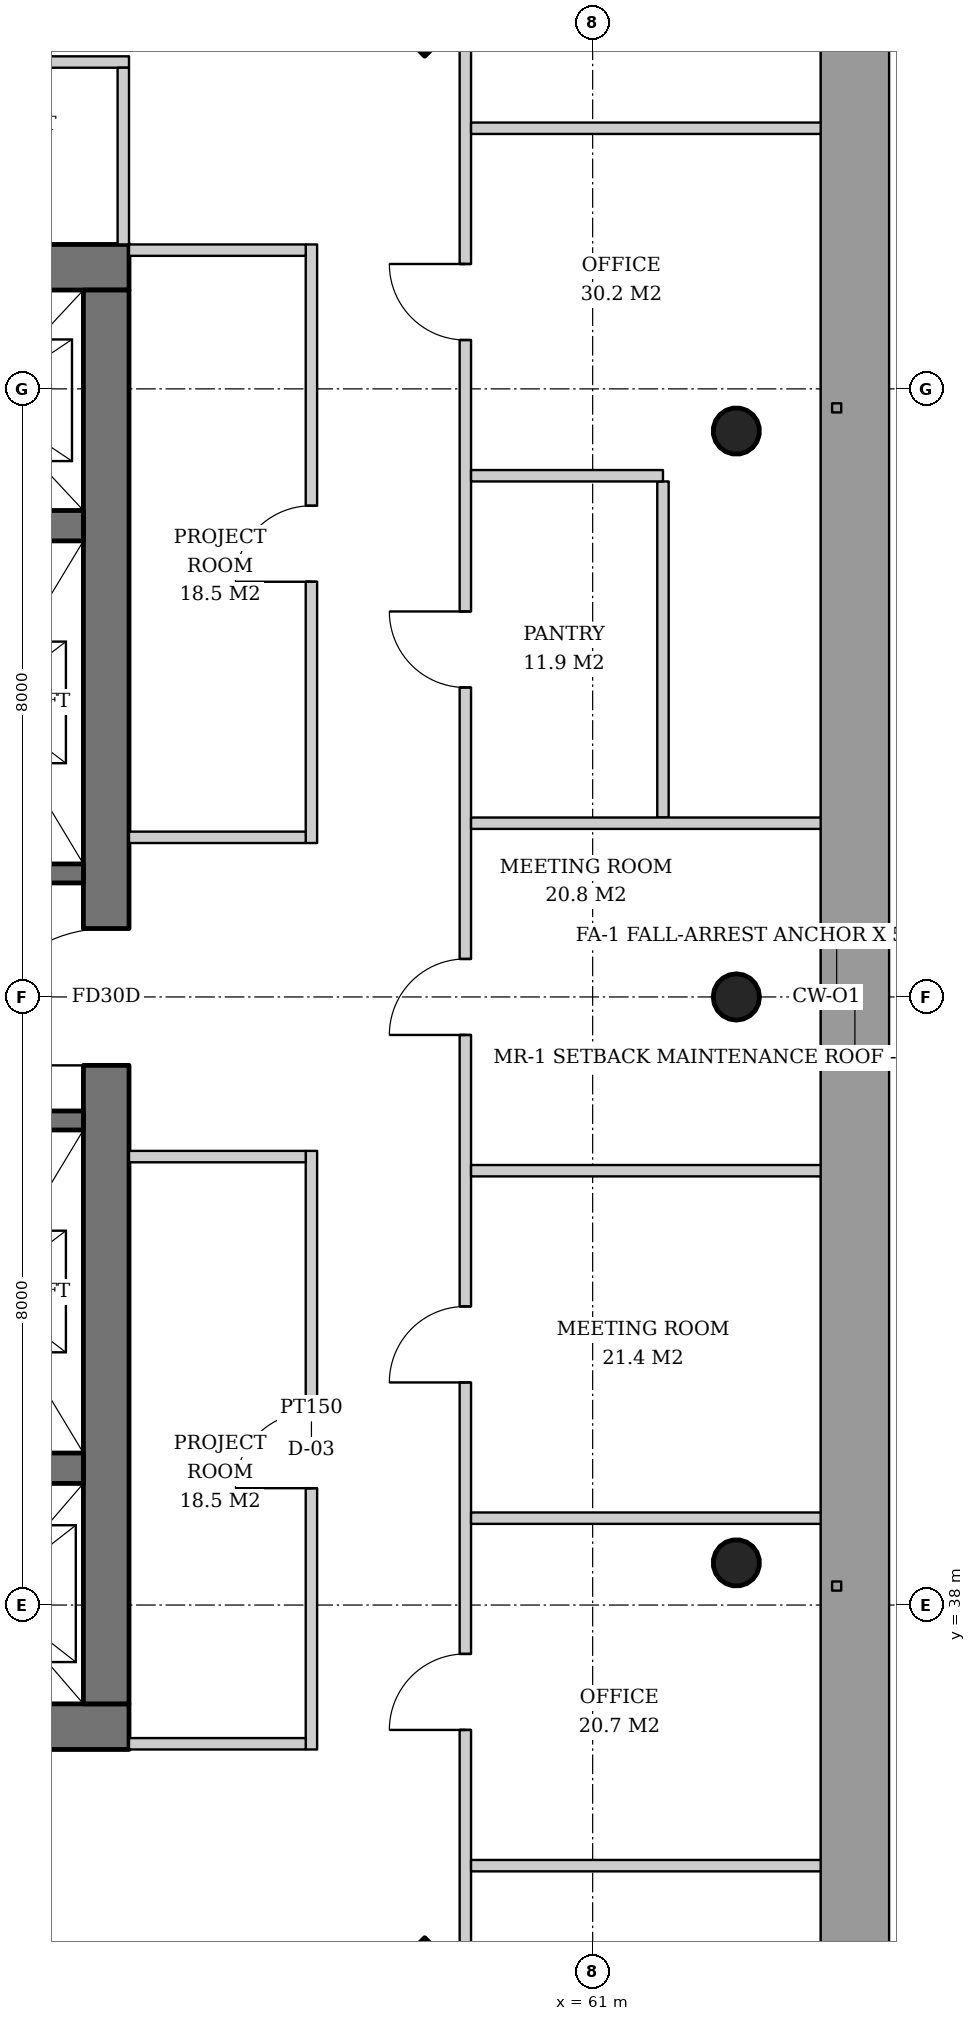
"""IFC4 building model, lengths in metres.
Left out: names, types, materials, properties, quantities, classifications, styles, units other than length and angle.
Written with IfcOpenShell. Run it as: python <this file> out.ifc"""

import sys

from ifc_helpers import new_model, si_unit, direction, frame, frame_2d, origin, origin_2d, place, context, subcontext, project, spatial, rectangle, hollow_circle, extrude, element, fill, save


model = new_model("IFC4")
c1 = context("Model", 3, precision=1e-05, world=origin(), true_north=direction((0.0, 1.0)))
c2 = subcontext(c1, "Body", "Model", "MODEL_VIEW")
j1 = project(units=[si_unit("LENGTHUNIT", "METRE"), si_unit("PLANEANGLEUNIT", "RADIAN")], contexts=[c1])
p1 = place(None, origin())
s1 = spatial("IfcSite", under=j1, at=p1, CompositionType="ELEMENT")
p2 = place(p1, origin())
s2 = spatial("IfcBuilding", under=s1, at=p2, CompositionType="ELEMENT")
p3 = place(p2, frame((0.0, 0.0, 211.0)))
s3 = spatial("IfcBuildingStorey", under=s2, at=p3, CompositionType="ELEMENT", Elevation=211.0)
p4 = place(p3, frame((58.829, 59.829, 0.0), z_axis=(-0.031962158256, -0.031962158256, 0.998977898093), x_axis=(0.707106781187, -0.707106781187, 0.0)))
e1 = element("IfcColumn", 1, at=p4, inside=s3, PredefinedType="COLUMN", context=c2, shape_type="SweptSolid", body=[
    extrude(rectangle(XDim=2.0, YDim=2.0, at=origin_2d()), origin(), (0.0, 0.0, 1.0), 3.804),
])
p5 = place(p3, frame((62.928, 38.536, 0.0), z_axis=(-0.031910269556, 0.015987237665, 0.999362868496), x_axis=(-0.447933021895, -0.894067115991, 0.0)))
e2 = element("IfcColumn", 2, at=p5, inside=s3, PredefinedType="COLUMN", context=c2, shape_type="SweptSolid", body=[
    extrude(hollow_circle(Radius=0.305, WallThickness=0.025, at=origin_2d()), origin(), (0.0, 0.0, 1.0), 3.802),
])
p6 = place(p3, frame((62.928, 46.0, 0.0), z_axis=(-0.031914348339, 0.0, 0.999490607445), x_axis=(0.0, -1.0, 0.0)))
e3 = element("IfcColumn", 3, at=p6, inside=s3, PredefinedType="COLUMN", context=c2, shape_type="SweptSolid", body=[
    extrude(hollow_circle(Radius=0.305, WallThickness=0.025, at=origin_2d()), origin(), (0.0, 0.0, 1.0), 3.802),
])
p7 = place(p3, frame((62.928, 53.464, 0.0), z_axis=(-0.031910269556, -0.015987237665, 0.999362868496), x_axis=(0.447933021895, -0.894067115991, 0.0)))
e4 = element("IfcColumn", 4, at=p7, inside=s3, PredefinedType="COLUMN", context=c2, shape_type="SweptSolid", body=[
    extrude(hollow_circle(Radius=0.305, WallThickness=0.025, at=origin_2d()), origin(), (0.0, 0.0, 1.0), 3.802),
])
p8 = place(p3, frame((58.829, 32.171, 0.0), z_axis=(-0.031962158256, 0.031962158256, 0.998977898093), x_axis=(-0.707106781187, -0.707106781187, 0.0)))
e5 = element("IfcColumn", 5, at=p8, inside=s3, PredefinedType="COLUMN", context=c2, shape_type="SweptSolid", body=[
    extrude(rectangle(XDim=2.0, YDim=2.0, at=origin_2d()), origin(), (0.0, 0.0, 1.0), 3.804),
])
p9 = place(p3, frame((35.1, 36.4, 0.0), z_axis=(0.0, 0.0, 1.0), x_axis=(1.0, 0.0, 0.0)))
e6 = element("IfcWall", 6, at=p9, inside=s3, PredefinedType="SHEAR", context=c2, shape_type="SweptSolid", body=[
    extrude(rectangle(XDim=19.8, YDim=0.6, at=frame_2d((9.9, 0.0))), origin(), (0.0, 0.0, 1.0), 3.8),
])
p10 = place(p9, frame((3.9, 0.0, 0.0)))
e7 = element("IfcOpeningElement", 7, at=p10, cuts=e6, PredefinedType="OPENING", context=c2, shape_type="SweptSolid", body=[
    extrude(rectangle(XDim=1.0, YDim=2.1, at=frame_2d((0.5, 1.05))), frame((0.0, 0.31, 0.0), z_axis=(0.0, -1.0, 0.0), x_axis=(1.0, 0.0, 0.0)), (0.0, 0.0, 1.0), 0.62),
])
p11 = place(p9, frame((15.35, 0.0, 0.0)))
e8 = element("IfcOpeningElement", 8, at=p11, cuts=e6, PredefinedType="OPENING", context=c2, shape_type="SweptSolid", body=[
    extrude(rectangle(XDim=1.0, YDim=2.1, at=frame_2d((0.5, 1.05))), frame((0.0, 0.31, 0.0), z_axis=(0.0, -1.0, 0.0), x_axis=(1.0, 0.0, 0.0)), (0.0, 0.0, 1.0), 0.62),
])
p12 = place(p3, frame((35.1, 55.6, 0.0), z_axis=(0.0, 0.0, 1.0), x_axis=(1.0, 0.0, 0.0)))
e9 = element("IfcWall", 9, at=p12, inside=s3, PredefinedType="SHEAR", context=c2, shape_type="SweptSolid", body=[
    extrude(rectangle(XDim=19.8, YDim=0.6, at=frame_2d((9.9, 0.0))), origin(), (0.0, 0.0, 1.0), 3.8),
])
p13 = place(p12, frame((14.54, 0.0, 0.0)))
e10 = element("IfcOpeningElement", 10, at=p13, cuts=e9, PredefinedType="OPENING", context=c2, shape_type="SweptSolid", body=[
    extrude(rectangle(XDim=1.0, YDim=2.1, at=frame_2d((0.5, 1.05))), frame((0.0, 0.31, 0.0), z_axis=(0.0, -1.0, 0.0), x_axis=(1.0, 0.0, 0.0)), (0.0, 0.0, 1.0), 0.62),
])
p14 = place(p12, frame((0.931, 0.0, 0.0)))
e11 = element("IfcOpeningElement", 11, at=p14, cuts=e9, PredefinedType="OPENING", context=c2, shape_type="SweptSolid", body=[
    extrude(rectangle(XDim=1.0, YDim=2.1, at=frame_2d((0.5, 1.05))), frame((0.0, 0.31, 0.0), z_axis=(0.0, -1.0, 0.0), x_axis=(1.0, 0.0, 0.0)), (0.0, 0.0, 1.0), 0.62),
])
p15 = place(p12, frame((2.448, 0.0, 0.0)))
e12 = element("IfcOpeningElement", 12, at=p15, cuts=e9, PredefinedType="OPENING", context=c2, shape_type="SweptSolid", body=[
    extrude(rectangle(XDim=1.0, YDim=2.1, at=frame_2d((0.5, 1.05))), frame((0.0, 0.31, 0.0), z_axis=(0.0, -1.0, 0.0), x_axis=(1.0, 0.0, 0.0)), (0.0, 0.0, 1.0), 0.62),
])
p16 = place(p12, frame((3.983, 0.0, 0.0)))
e13 = element("IfcOpeningElement", 13, at=p16, cuts=e9, PredefinedType="OPENING", context=c2, shape_type="SweptSolid", body=[
    extrude(rectangle(XDim=1.0, YDim=2.1, at=frame_2d((0.5, 1.05))), frame((0.0, 0.31, 0.0), z_axis=(0.0, -1.0, 0.0), x_axis=(1.0, 0.0, 0.0)), (0.0, 0.0, 1.0), 0.62),
])
p17 = place(p3, frame((54.6, 36.7, 0.0), z_axis=(0.0, 0.0, 1.0), x_axis=(0.0, 1.0, 0.0)))
e14 = element("IfcWall", 14, at=p17, inside=s3, PredefinedType="SHEAR", context=c2, shape_type="SweptSolid", body=[
    extrude(rectangle(XDim=18.6, YDim=0.6, at=frame_2d((9.3, 0.0))), origin(), (0.0, 0.0, 1.0), 3.8),
])
p18 = place(p17, frame((8.4, 0.0, 0.0)))
e15 = element("IfcOpeningElement", 15, at=p18, cuts=e14, PredefinedType="OPENING", context=c2, shape_type="SweptSolid", body=[
    extrude(rectangle(XDim=1.8, YDim=2.4, at=frame_2d((0.9, 1.2))), frame((0.0, 0.31, 0.0), z_axis=(0.0, -1.0, 0.0), x_axis=(1.0, 0.0, 0.0)), (0.0, 0.0, 1.0), 0.62),
])
for number, where, z_axis, x_axis in (
    (16, (35.7, 39.8, 0.0), (0.0, 0.0, 1.0), (1.0, 0.0, 0.0)),
    (17, (35.7, 52.2, 0.0), (0.0, 0.0, 1.0), (1.0, 0.0, 0.0)),
):
    element("IfcWall", number, at=place(p3, frame(where, z_axis=z_axis, x_axis=x_axis)), inside=s3, PredefinedType="SHEAR", context=c2, shape_type="SweptSolid", body=[
        extrude(rectangle(XDim=18.6, YDim=0.4, at=frame_2d((9.3, 0.0))), origin(), (0.0, 0.0, 1.0), 3.8),
    ])
for number, where, z_axis, x_axis in (
    (18, (48.93, 47.625, 0.0), (0.0, 0.0, 1.0), (1.0, 0.0, 0.0)),
    (19, (48.93, 44.375, 0.0), (0.0, 0.0, 1.0), (1.0, 0.0, 0.0)),
):
    element("IfcWall", number, at=place(p3, frame(where, z_axis=z_axis, x_axis=x_axis)), inside=s3, PredefinedType="SHEAR", context=c2, shape_type="SweptSolid", body=[
        extrude(rectangle(XDim=5.37, YDim=0.25, at=frame_2d((2.685, 0.0))), origin(), (0.0, 0.0, 1.0), 3.8),
    ])
p19 = place(p3, frame((57.3, 36.1, 0.0), z_axis=(0.0, 0.0, 1.0), x_axis=(0.0, 1.0, 0.0)))
e20 = element("IfcWall", 20, at=p19, inside=s3, PredefinedType="PARTITIONING", context=c2, shape_type="SweptSolid", body=[
    extrude(rectangle(XDim=7.875, YDim=0.15, at=frame_2d((3.938, 0.0))), origin(), (0.0, 0.0, 1.0), 2.867),
])
p20 = place(p19, frame((3.438, 0.0, 0.0)))
e21 = element("IfcOpeningElement", 21, at=p20, cuts=e20, PredefinedType="OPENING", context=c2, shape_type="SweptSolid", body=[
    extrude(rectangle(XDim=1.0, YDim=2.1, at=frame_2d((0.5, 1.05))), frame((0.0, 0.085, 0.0), z_axis=(0.0, -1.0, 0.0), x_axis=(1.0, 0.0, 0.0)), (0.0, 0.0, 1.0), 0.17),
])
p21 = place(p3, frame((54.9, 36.175, 0.0), z_axis=(0.0, 0.0, 1.0), x_axis=(1.0, 0.0, 0.0)))
e22 = element("IfcWall", 22, at=p21, inside=s3, PredefinedType="PARTITIONING", context=c2, shape_type="SweptSolid", body=[
    extrude(rectangle(XDim=2.325, YDim=0.15, at=frame_2d((1.163, 0.0))), origin(), (0.0, 0.0, 1.0), 2.867),
])
p22 = place(p3, frame((54.9, 43.9, 0.0), z_axis=(0.0, 0.0, 1.0), x_axis=(1.0, 0.0, 0.0)))
e23 = element("IfcWall", 23, at=p22, inside=s3, PredefinedType="PARTITIONING", context=c2, shape_type="SweptSolid", body=[
    extrude(rectangle(XDim=2.325, YDim=0.15, at=frame_2d((1.163, 0.0))), origin(), (0.0, 0.0, 1.0), 3.62),
])
p23 = place(p3, frame((57.3, 48.025, 0.0), z_axis=(0.0, 0.0, 1.0), x_axis=(0.0, 1.0, 0.0)))
e24 = element("IfcWall", 24, at=p23, inside=s3, PredefinedType="PARTITIONING", context=c2, shape_type="SweptSolid", body=[
    extrude(rectangle(XDim=7.875, YDim=0.15, at=frame_2d((3.938, 0.0))), origin(), (0.0, 0.0, 1.0), 2.867),
])
p24 = place(p23, frame((3.438, 0.0, 0.0)))
e25 = element("IfcOpeningElement", 25, at=p24, cuts=e24, PredefinedType="OPENING", context=c2, shape_type="SweptSolid", body=[
    extrude(rectangle(XDim=1.0, YDim=2.1, at=frame_2d((0.5, 1.05))), frame((0.0, 0.085, 0.0), z_axis=(0.0, -1.0, 0.0), x_axis=(1.0, 0.0, 0.0)), (0.0, 0.0, 1.0), 0.17),
])
p25 = place(p3, frame((54.9, 48.1, 0.0), z_axis=(0.0, 0.0, 1.0), x_axis=(1.0, 0.0, 0.0)))
e26 = element("IfcWall", 26, at=p25, inside=s3, PredefinedType="PARTITIONING", context=c2, shape_type="SweptSolid", body=[
    extrude(rectangle(XDim=2.325, YDim=0.15, at=frame_2d((1.163, 0.0))), origin(), (0.0, 0.0, 1.0), 2.867),
])
p26 = place(p3, frame((54.9, 55.825, 0.0), z_axis=(0.0, 0.0, 1.0), x_axis=(1.0, 0.0, 0.0)))
e27 = element("IfcWall", 27, at=p26, inside=s3, PredefinedType="PARTITIONING", context=c2, shape_type="SweptSolid", body=[
    extrude(rectangle(XDim=2.325, YDim=0.15, at=frame_2d((1.163, 0.0))), origin(), (0.0, 0.0, 1.0), 3.62),
])
p27 = place(p3, frame((54.9, 58.3, 0.0), z_axis=(0.0, 0.0, 1.0), x_axis=(-1.0, 0.0, 0.0)))
e28 = element("IfcWall", 28, at=p27, inside=s3, PredefinedType="PARTITIONING", context=c2, shape_type="SweptSolid", body=[
    extrude(rectangle(XDim=3.135, YDim=0.15, at=frame_2d((1.567, 0.0))), origin(), (0.0, 0.0, 1.0), 2.92),
])
p28 = place(p27, frame((1.067, 0.0, 0.0)))
e29 = element("IfcOpeningElement", 29, at=p28, cuts=e28, PredefinedType="OPENING", context=c2, shape_type="SweptSolid", body=[
    extrude(rectangle(XDim=1.0, YDim=2.1, at=frame_2d((0.5, 1.05))), frame((0.0, 0.085, 0.0), z_axis=(0.0, -1.0, 0.0), x_axis=(1.0, 0.0, 0.0)), (0.0, 0.0, 1.0), 0.17),
])
p29 = place(p3, frame((54.825, 55.9, 0.0), z_axis=(0.0, 0.0, 1.0), x_axis=(0.0, 1.0, 0.0)))
e30 = element("IfcWall", 30, at=p29, inside=s3, PredefinedType="PARTITIONING", context=c2, shape_type="SweptSolid", body=[
    extrude(rectangle(XDim=2.325, YDim=0.15, at=frame_2d((1.163, 0.0))), origin(), (0.0, 0.0, 1.0), 2.867),
])
p30 = place(p3, frame((61.925, 48.361, 0.0), z_axis=(0.0, 0.0, 1.0), x_axis=(0.0, 1.0, 0.0)))
e31 = element("IfcWall", 31, at=p30, inside=s3, PredefinedType="PARTITIONING", context=c2, shape_type="SweptSolid", body=[
    extrude(rectangle(XDim=4.422, YDim=0.15, at=frame_2d((2.211, 0.0))), origin(), (0.0, 0.0, 1.0), 2.867),
])
p31 = place(p3, frame((59.325, 33.164, 0.0), z_axis=(0.0, 0.0, 1.0), x_axis=(0.0, 1.0, 0.0)))
e32 = element("IfcWall", 32, at=p31, inside=s3, PredefinedType="PARTITIONING", context=c2, shape_type="SweptSolid", body=[
    extrude(rectangle(XDim=25.671, YDim=0.15, at=frame_2d((12.836, 0.0))), origin(), (0.0, 0.0, 1.0), 2.867),
])
p32 = place(p31, frame((3.193, 0.0, 0.0)))
e33 = element("IfcOpeningElement", 33, at=p32, cuts=e32, PredefinedType="OPENING", context=c2, shape_type="SweptSolid", body=[
    extrude(rectangle(XDim=1.0, YDim=2.1, at=frame_2d((0.5, 1.05))), frame((0.0, 0.085, 0.0), z_axis=(0.0, -1.0, 0.0), x_axis=(1.0, 0.0, 0.0)), (0.0, 0.0, 1.0), 0.17),
])
p33 = place(p31, frame((7.764, 0.0, 0.0)))
e34 = element("IfcOpeningElement", 34, at=p33, cuts=e32, PredefinedType="OPENING", context=c2, shape_type="SweptSolid", body=[
    extrude(rectangle(XDim=1.0, YDim=2.1, at=frame_2d((0.5, 1.05))), frame((0.0, 0.085, 0.0), z_axis=(0.0, -1.0, 0.0), x_axis=(1.0, 0.0, 0.0)), (0.0, 0.0, 1.0), 0.17),
])
p34 = place(p31, frame((12.336, 0.0, 0.0)))
e35 = element("IfcOpeningElement", 35, at=p34, cuts=e32, PredefinedType="OPENING", context=c2, shape_type="SweptSolid", body=[
    extrude(rectangle(XDim=1.0, YDim=2.1, at=frame_2d((0.5, 1.05))), frame((0.0, 0.085, 0.0), z_axis=(0.0, -1.0, 0.0), x_axis=(1.0, 0.0, 0.0)), (0.0, 0.0, 1.0), 0.17),
])
p35 = place(p31, frame((16.907, 0.0, 0.0)))
e36 = element("IfcOpeningElement", 36, at=p35, cuts=e32, PredefinedType="OPENING", context=c2, shape_type="SweptSolid", body=[
    extrude(rectangle(XDim=1.0, YDim=2.1, at=frame_2d((0.5, 1.05))), frame((0.0, 0.085, 0.0), z_axis=(0.0, -1.0, 0.0), x_axis=(1.0, 0.0, 0.0)), (0.0, 0.0, 1.0), 0.17),
])
p36 = place(p31, frame((21.479, 0.0, 0.0)))
e37 = element("IfcOpeningElement", 37, at=p36, cuts=e32, PredefinedType="OPENING", context=c2, shape_type="SweptSolid", body=[
    extrude(rectangle(XDim=1.0, YDim=2.1, at=frame_2d((0.5, 1.05))), frame((0.0, 0.085, 0.0), z_axis=(0.0, -1.0, 0.0), x_axis=(1.0, 0.0, 0.0)), (0.0, 0.0, 1.0), 0.17),
])
for number, where, z_axis, x_axis in (
    (38, (59.4, 34.572, 0.0), (0.0, 0.0, 1.0), (1.0, 0.0, 0.0)),
    (39, (59.4, 39.143, 0.0), (0.0, 0.0, 1.0), (1.0, 0.0, 0.0)),
    (40, (59.4, 43.714, 0.0), (0.0, 0.0, 1.0), (1.0, 0.0, 0.0)),
):
    element("IfcWall", number, at=place(p3, frame(where, z_axis=z_axis, x_axis=x_axis)), inside=s3, PredefinedType="PARTITIONING", context=c2, shape_type="SweptSolid", body=[
        extrude(rectangle(XDim=4.64, YDim=0.15, at=frame_2d((2.32, 0.0))), origin(), (0.0, 0.0, 1.0), 3.12),
    ])
p37 = place(p3, frame((59.4, 48.286, 0.0), z_axis=(0.0, 0.0, 1.0), x_axis=(1.0, 0.0, 0.0)))
e41 = element("IfcWall", 41, at=p37, inside=s3, PredefinedType="PARTITIONING", context=c2, shape_type="SweptSolid", body=[
    extrude(rectangle(XDim=4.64, YDim=0.15, at=frame_2d((2.32, 0.0))), origin(), (0.0, 0.0, 1.0), 2.867),
])
p38 = place(p3, frame((59.4, 52.857, 0.0), z_axis=(0.0, 0.0, 1.0), x_axis=(1.0, 0.0, 0.0)))
e42 = element("IfcWall", 42, at=p38, inside=s3, PredefinedType="PARTITIONING", context=c2, shape_type="SweptSolid", body=[
    extrude(rectangle(XDim=2.525, YDim=0.15, at=frame_2d((1.263, 0.0))), origin(), (0.0, 0.0, 1.0), 3.62),
])
p39 = place(p3, frame((59.4, 57.428, 0.0), z_axis=(0.0, 0.0, 1.0), x_axis=(1.0, 0.0, 0.0)))
e43 = element("IfcWall", 43, at=p39, inside=s3, PredefinedType="PARTITIONING", context=c2, shape_type="SweptSolid", body=[
    extrude(rectangle(XDim=4.64, YDim=0.15, at=frame_2d((2.32, 0.0))), origin(), (0.0, 0.0, 1.0), 3.12),
])
p40 = place(p18, origin())
e44 = element("IfcDoor", 44, at=p40, inside=s3, OperationType="DOUBLE_DOOR_SINGLE_SWING", PredefinedType="DOOR", context=c2, shape_type="SweptSolid", body=[
    extrude(rectangle(XDim=1.8, YDim=2.4, at=frame_2d((0.9, 1.2))), frame((0.0, 0.025, 0.0), z_axis=(0.0, -1.0, 0.0), x_axis=(1.0, 0.0, 0.0)), (0.0, 0.0, 1.0), 0.05),
])
fill(e15, e44)
p41 = place(p20, origin())
e45 = element("IfcDoor", 45, at=p41, inside=s3, OperationType="SINGLE_SWING_LEFT", PredefinedType="DOOR", context=c2, shape_type="SweptSolid", body=[
    extrude(rectangle(XDim=1.0, YDim=2.1, at=frame_2d((0.5, 1.05))), frame((0.0, 0.025, 0.0), z_axis=(0.0, -1.0, 0.0), x_axis=(1.0, 0.0, 0.0)), (0.0, 0.0, 1.0), 0.05),
])
fill(e21, e45)
p42 = place(p24, origin())
e46 = element("IfcDoor", 46, at=p42, inside=s3, OperationType="SINGLE_SWING_LEFT", PredefinedType="DOOR", context=c2, shape_type="SweptSolid", body=[
    extrude(rectangle(XDim=1.0, YDim=2.1, at=frame_2d((0.5, 1.05))), frame((0.0, 0.025, 0.0), z_axis=(0.0, -1.0, 0.0), x_axis=(1.0, 0.0, 0.0)), (0.0, 0.0, 1.0), 0.05),
])
fill(e25, e46)
p43 = place(p32, origin())
e47 = element("IfcDoor", 47, at=p43, inside=s3, OperationType="SINGLE_SWING_LEFT", PredefinedType="DOOR", context=c2, shape_type="SweptSolid", body=[
    extrude(rectangle(XDim=1.0, YDim=2.1, at=frame_2d((0.5, 1.05))), frame((0.0, 0.025, 0.0), z_axis=(0.0, -1.0, 0.0), x_axis=(1.0, 0.0, 0.0)), (0.0, 0.0, 1.0), 0.05),
])
fill(e33, e47)
p44 = place(p33, origin())
e48 = element("IfcDoor", 48, at=p44, inside=s3, OperationType="SINGLE_SWING_LEFT", PredefinedType="DOOR", context=c2, shape_type="SweptSolid", body=[
    extrude(rectangle(XDim=1.0, YDim=2.1, at=frame_2d((0.5, 1.05))), frame((0.0, 0.025, 0.0), z_axis=(0.0, -1.0, 0.0), x_axis=(1.0, 0.0, 0.0)), (0.0, 0.0, 1.0), 0.05),
])
fill(e34, e48)
p45 = place(p34, origin())
e49 = element("IfcDoor", 49, at=p45, inside=s3, OperationType="SINGLE_SWING_LEFT", PredefinedType="DOOR", context=c2, shape_type="SweptSolid", body=[
    extrude(rectangle(XDim=1.0, YDim=2.1, at=frame_2d((0.5, 1.05))), frame((0.0, 0.025, 0.0), z_axis=(0.0, -1.0, 0.0), x_axis=(1.0, 0.0, 0.0)), (0.0, 0.0, 1.0), 0.05),
])
fill(e35, e49)
p46 = place(p35, origin())
e50 = element("IfcDoor", 50, at=p46, inside=s3, OperationType="SINGLE_SWING_RIGHT", PredefinedType="DOOR", context=c2, shape_type="SweptSolid", body=[
    extrude(rectangle(XDim=1.0, YDim=2.1, at=frame_2d((0.5, 1.05))), frame((0.0, 0.025, 0.0), z_axis=(0.0, -1.0, 0.0), x_axis=(1.0, 0.0, 0.0)), (0.0, 0.0, 1.0), 0.05),
])
fill(e36, e50)
p47 = place(p36, origin())
e51 = element("IfcDoor", 51, at=p47, inside=s3, OperationType="SINGLE_SWING_RIGHT", PredefinedType="DOOR", context=c2, shape_type="SweptSolid", body=[
    extrude(rectangle(XDim=1.0, YDim=2.1, at=frame_2d((0.5, 1.05))), frame((0.0, 0.025, 0.0), z_axis=(0.0, -1.0, 0.0), x_axis=(1.0, 0.0, 0.0)), (0.0, 0.0, 1.0), 0.05),
])
fill(e37, e51)
save(model, sys.argv[1])
